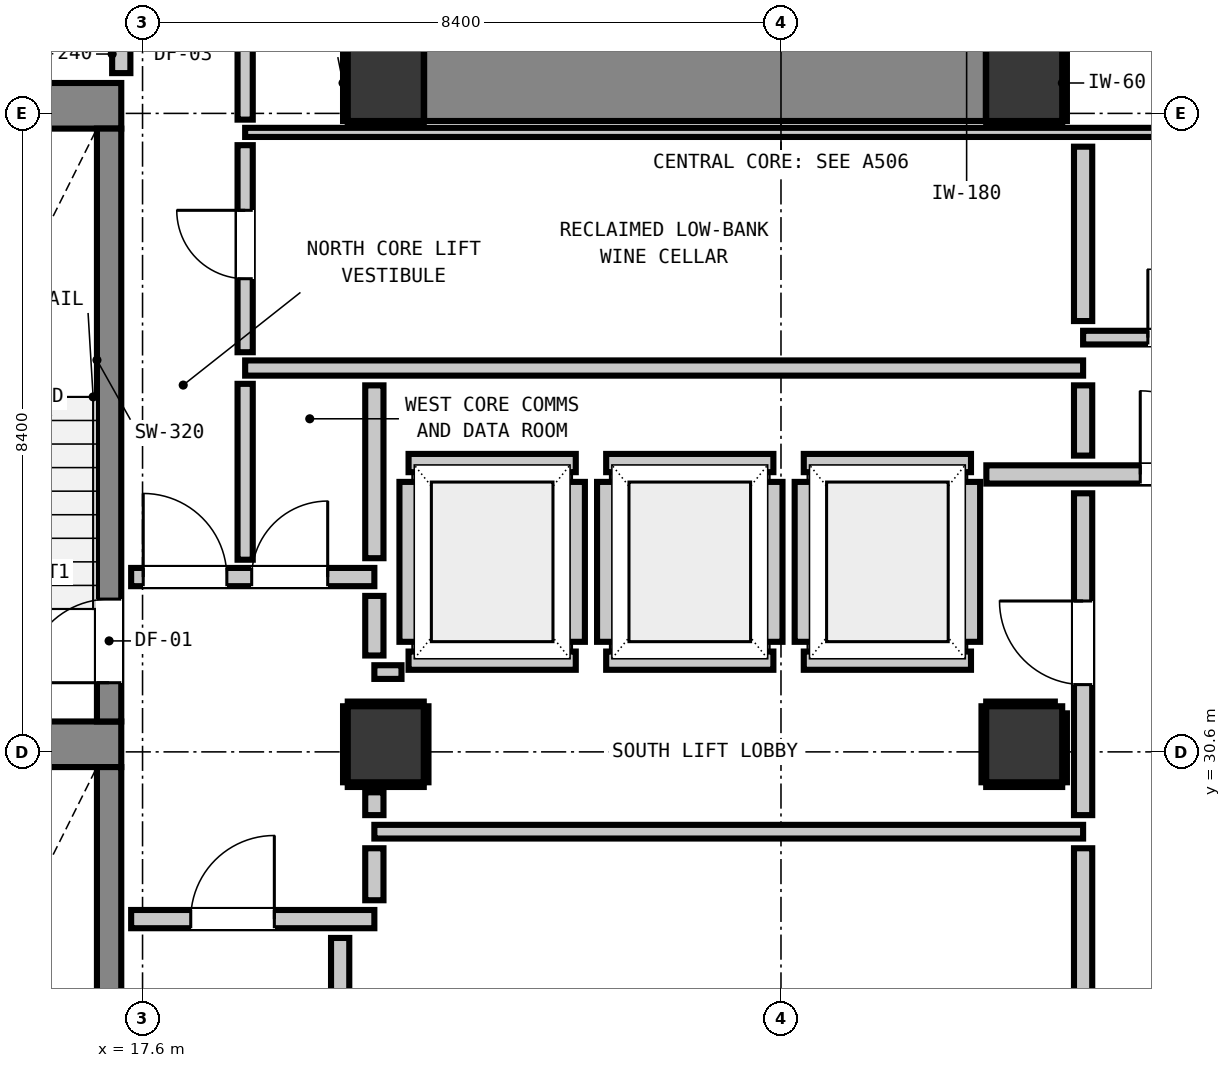
"""IFC4 building model, lengths in metres.
Left out: names, types, materials, properties, quantities, classifications, styles, units other than length and angle.
Written with IfcOpenShell. Run it as: python <this file> out.ifc"""

import sys

from ifc_helpers import new_model, si_unit, direction, frame, frame_2d, origin, origin_2d, place, context, subcontext, project, spatial, rectangle, extrude, element, fill, save


model = new_model("IFC4")
c1 = context("Model", 3, precision=1e-05, world=origin(), true_north=direction((0.0, 1.0)))
c2 = subcontext(c1, "Body", "Model", "MODEL_VIEW")
j1 = project(units=[si_unit("LENGTHUNIT", "METRE"), si_unit("PLANEANGLEUNIT", "RADIAN")], contexts=[c1])
p1 = place(None, origin())
s1 = spatial("IfcSite", under=j1, at=p1, CompositionType="ELEMENT")
p2 = place(p1, origin())
s2 = spatial("IfcBuilding", under=s1, at=p2, CompositionType="ELEMENT")
p3 = place(p2, frame((0.0, 0.0, 122.68)))
s3 = spatial("IfcBuildingStorey", under=s2, at=p3, CompositionType="ELEMENT", Elevation=122.68)
for number, where, z_axis, x_axis in (
    (1, (20.8, 39.4, 0.0), (0.0, 0.0, 1.0), (1.0, 0.0, 0.0)),
    (2, (29.2, 39.4, 0.0), (0.0, 0.0, 1.0), (1.0, 0.0, 0.0)),
):
    element("IfcColumn", number, at=place(p3, frame(where, z_axis=z_axis, x_axis=x_axis)), inside=s3, PredefinedType="COLUMN", context=c2, shape_type="SweptSolid", body=[
        extrude(rectangle(XDim=1.0, YDim=1.0, at=origin_2d()), origin(), (0.0, 0.0, 1.0), 3.32),
    ])
p4 = place(p3, frame((13.24, 39.1, 0.0), z_axis=(0.0, 0.0, 1.0), x_axis=(1.0, 0.0, 0.0)))
e3 = element("IfcWall", 3, at=p4, inside=s3, PredefinedType="SHEAR", context=c2, shape_type="SweptSolid", body=[
    extrude(rectangle(XDim=4.08, YDim=0.6, at=frame_2d((2.04, 0.0))), origin(), (0.0, 0.0, 1.0), 3.32),
])
p5 = place(p3, frame((13.905, 30.7, 0.0), z_axis=(0.0, 0.0, 1.0), x_axis=(1.0, 0.0, 0.0)))
e4 = element("IfcWall", 4, at=p5, inside=s3, PredefinedType="SHEAR", context=c2, shape_type="SweptSolid", body=[
    extrude(rectangle(XDim=3.415, YDim=0.6, at=frame_2d((1.708, 0.0))), origin(), (0.0, 0.0, 1.0), 3.32),
])
p6 = place(p3, frame((21.305, 39.4, 0.0), z_axis=(0.0, 0.0, 1.0), x_axis=(1.0, 0.0, 0.0)))
e5 = element("IfcWall", 5, at=p6, inside=s3, PredefinedType="SHEAR", context=c2, shape_type="SweptSolid", body=[
    extrude(rectangle(XDim=7.39, YDim=1.0, at=frame_2d((3.695, 0.0))), origin(), (0.0, 0.0, 1.0), 3.32),
])
p7 = place(p3, frame((17.16, 31.0, 0.0), z_axis=(0.0, 0.0, 1.0), x_axis=(0.0, 1.0, 0.0)))
e6 = element("IfcWall", 6, at=p7, inside=s3, PredefinedType="SHEAR", context=c2, shape_type="SweptSolid", body=[
    extrude(rectangle(XDim=7.8, YDim=0.32, at=frame_2d((3.9, 0.0))), origin(), (0.0, 0.0, 1.0), 3.32),
])
p8 = place(p7, frame((0.51, 0.0, 0.0)))
e7 = element("IfcOpeningElement", 7, at=p8, cuts=e6, PredefinedType="OPENING", context=c2, shape_type="SweptSolid", body=[
    extrude(rectangle(XDim=1.1, YDim=2.15, at=frame_2d((0.55, 1.075))), frame((0.0, 0.17, 0.0), z_axis=(0.0, -1.0, 0.0), x_axis=(1.0, 0.0, 0.0)), (0.0, 0.0, 1.0), 0.34),
])
p9 = place(p3, frame((17.16, 22.5, 0.0), z_axis=(0.0, 0.0, 1.0), x_axis=(0.0, 1.0, 0.0)))
e8 = element("IfcWall", 8, at=p9, inside=s3, PredefinedType="SHEAR", context=c2, shape_type="SweptSolid", body=[
    extrude(rectangle(XDim=7.9, YDim=0.32, at=frame_2d((3.95, 0.0))), origin(), (0.0, 0.0, 1.0), 3.32),
])
p10 = place(p9, frame((0.29, 0.0, 0.0)))
e9 = element("IfcOpeningElement", 9, at=p10, cuts=e8, PredefinedType="OPENING", context=c2, shape_type="SweptSolid", body=[
    extrude(rectangle(XDim=1.1, YDim=2.15, at=frame_2d((0.55, 1.075))), frame((0.0, 0.17, 0.0), z_axis=(0.0, -1.0, 0.0), x_axis=(1.0, 0.0, 0.0)), (0.0, 0.0, 1.0), 0.34),
])
for number, where, z_axis, x_axis in (
    (10, (20.8, 30.7, 0.0), (0.0, 0.0, 1.0), (1.0, 0.0, 0.0)),
    (11, (29.2, 30.7, 0.0), (0.0, 0.0, 1.0), (1.0, 0.0, 0.0)),
):
    element("IfcColumn", number, at=place(p3, frame(where, z_axis=z_axis, x_axis=x_axis)), inside=s3, PredefinedType="COLUMN", context=c2, shape_type="SweptSolid", body=[
        extrude(rectangle(XDim=1.0, YDim=1.0, at=origin_2d()), origin(), (0.0, 0.0, 1.0), 3.32),
    ])
for number, where, z_axis, x_axis in (
    (12, (21.1, 31.8, 0.0), (0.0, 0.0, 1.0), (1.0, 0.0, 0.0)),
    (13, (21.1, 34.4, 0.0), (0.0, 0.0, 1.0), (1.0, 0.0, 0.0)),
):
    element("IfcWall", number, at=place(p3, frame(where, z_axis=z_axis, x_axis=x_axis)), inside=s3, PredefinedType="PARTITIONING", context=c2, shape_type="SweptSolid", body=[
        extrude(rectangle(XDim=2.2, YDim=0.24, at=frame_2d((1.1, 0.0))), origin(), (0.0, 0.0, 1.0), 2.9),
    ])
p11 = place(p3, frame((21.1, 32.048, 0.0), z_axis=(0.0, 0.0, 1.0), x_axis=(0.0, 1.0, 0.0)))
e14 = element("IfcWall", 14, at=p11, inside=s3, PredefinedType="PARTITIONING", context=c2, shape_type="SweptSolid", body=[
    extrude(rectangle(XDim=2.104, YDim=0.24, at=frame_2d((1.052, 0.0))), origin(), (0.0, 0.0, 1.0), 0.905),
])
p12 = place(p3, frame((23.3, 32.048, 0.0), z_axis=(0.0, 0.0, 1.0), x_axis=(0.0, 1.0, 0.0)))
e15 = element("IfcWall", 15, at=p12, inside=s3, PredefinedType="PARTITIONING", context=c2, shape_type="SweptSolid", body=[
    extrude(rectangle(XDim=2.104, YDim=0.24, at=frame_2d((1.052, 0.0))), origin(), (0.0, 0.0, 1.0), 2.9),
])
for number, where, z_axis, x_axis in (
    (16, (23.7, 31.8, 0.0), (0.0, 0.0, 1.0), (1.0, 0.0, 0.0)),
    (17, (23.7, 34.4, 0.0), (0.0, 0.0, 1.0), (1.0, 0.0, 0.0)),
):
    element("IfcWall", number, at=place(p3, frame(where, z_axis=z_axis, x_axis=x_axis)), inside=s3, PredefinedType="PARTITIONING", context=c2, shape_type="SweptSolid", body=[
        extrude(rectangle(XDim=2.2, YDim=0.24, at=frame_2d((1.1, 0.0))), origin(), (0.0, 0.0, 1.0), 2.9),
    ])
for number, where, z_axis, x_axis in (
    (18, (23.7, 32.048, 0.0), (0.0, 0.0, 1.0), (0.0, 1.0, 0.0)),
    (19, (25.9, 32.048, 0.0), (0.0, 0.0, 1.0), (0.0, 1.0, 0.0)),
):
    element("IfcWall", number, at=place(p3, frame(where, z_axis=z_axis, x_axis=x_axis)), inside=s3, PredefinedType="PARTITIONING", context=c2, shape_type="SweptSolid", body=[
        extrude(rectangle(XDim=2.104, YDim=0.24, at=frame_2d((1.052, 0.0))), origin(), (0.0, 0.0, 1.0), 2.9),
    ])
for number, where, z_axis, x_axis in (
    (20, (26.3, 31.8, 0.0), (0.0, 0.0, 1.0), (1.0, 0.0, 0.0)),
    (21, (26.3, 34.4, 0.0), (0.0, 0.0, 1.0), (1.0, 0.0, 0.0)),
):
    element("IfcWall", number, at=place(p3, frame(where, z_axis=z_axis, x_axis=x_axis)), inside=s3, PredefinedType="PARTITIONING", context=c2, shape_type="SweptSolid", body=[
        extrude(rectangle(XDim=2.2, YDim=0.24, at=frame_2d((1.1, 0.0))), origin(), (0.0, 0.0, 1.0), 2.9),
    ])
p13 = place(p3, frame((26.3, 32.048, 0.0), z_axis=(0.0, 0.0, 1.0), x_axis=(0.0, 1.0, 0.0)))
e22 = element("IfcWall", 22, at=p13, inside=s3, PredefinedType="PARTITIONING", context=c2, shape_type="SweptSolid", body=[
    extrude(rectangle(XDim=2.104, YDim=0.24, at=frame_2d((1.052, 0.0))), origin(), (0.0, 0.0, 1.0), 2.9),
])
p14 = place(p3, frame((28.5, 32.048, 0.0), z_axis=(0.0, 0.0, 1.0), x_axis=(0.0, 1.0, 0.0)))
e23 = element("IfcWall", 23, at=p14, inside=s3, PredefinedType="PARTITIONING", context=c2, shape_type="SweptSolid", body=[
    extrude(rectangle(XDim=2.104, YDim=0.24, at=frame_2d((1.052, 0.0))), origin(), (0.0, 0.0, 1.0), 0.905),
])
p15 = place(p3, frame((17.45, 28.4, 0.0), z_axis=(0.0, 0.0, 1.0), x_axis=(1.0, 0.0, 0.0)))
e24 = element("IfcWall", 24, at=p15, inside=s3, PredefinedType="PARTITIONING", context=c2, shape_type="SweptSolid", body=[
    extrude(rectangle(XDim=3.2, YDim=0.24, at=frame_2d((1.6, 0.0))), origin(), (0.0, 0.0, 1.0), 2.9),
])
p16 = place(p15, frame((0.784, 0.0, 0.0)))
e25 = element("IfcOpeningElement", 25, at=p16, cuts=e24, PredefinedType="OPENING", context=c2, shape_type="SweptSolid", body=[
    extrude(rectangle(XDim=1.1, YDim=2.15, at=frame_2d((0.55, 1.075))), frame((0.0, 0.13, 0.0), z_axis=(0.0, -1.0, 0.0), x_axis=(1.0, 0.0, 0.0)), (0.0, 0.0, 1.0), 0.26),
])
p17 = place(p3, frame((17.45, 32.9, 0.0), z_axis=(0.0, 0.0, 1.0), x_axis=(1.0, 0.0, 0.0)))
e26 = element("IfcWall", 26, at=p17, inside=s3, PredefinedType="PARTITIONING", context=c2, shape_type="SweptSolid", body=[
    extrude(rectangle(XDim=3.2, YDim=0.24, at=frame_2d((1.6, 0.0))), origin(), (0.0, 0.0, 1.0), 2.9),
])
p18 = place(p17, frame((0.159, 0.0, 0.0)))
e27 = element("IfcOpeningElement", 27, at=p18, cuts=e26, PredefinedType="OPENING", context=c2, shape_type="SweptSolid", body=[
    extrude(rectangle(XDim=1.1, YDim=2.15, at=frame_2d((0.55, 1.075))), frame((0.0, 0.13, 0.0), z_axis=(0.0, -1.0, 0.0), x_axis=(1.0, 0.0, 0.0)), (0.0, 0.0, 1.0), 0.26),
])
p19 = place(p17, frame((1.586, 0.0, 0.0)))
e28 = element("IfcOpeningElement", 28, at=p19, cuts=e26, PredefinedType="OPENING", context=c2, shape_type="SweptSolid", body=[
    extrude(rectangle(XDim=1.0, YDim=2.15, at=frame_2d((0.5, 1.075))), frame((0.0, 0.13, 0.0), z_axis=(0.0, -1.0, 0.0), x_axis=(1.0, 0.0, 0.0)), (0.0, 0.0, 1.0), 0.26),
])
p20 = place(p3, frame((28.702, 34.25, 0.0), z_axis=(0.0, 0.0, 1.0), x_axis=(1.0, 0.0, 0.0)))
e29 = element("IfcWall", 29, at=p20, inside=s3, PredefinedType="PARTITIONING", context=c2, shape_type="SweptSolid", body=[
    extrude(rectangle(XDim=3.748, YDim=0.24, at=frame_2d((1.874, 0.0))), origin(), (0.0, 0.0, 1.0), 2.9),
])
p21 = place(p20, frame((2.025, 0.0, 0.0)))
e30 = element("IfcOpeningElement", 30, at=p21, cuts=e29, PredefinedType="OPENING", context=c2, shape_type="SweptSolid", body=[
    extrude(rectangle(XDim=1.1, YDim=2.15, at=frame_2d((0.55, 1.075))), frame((0.0, 0.13, 0.0), z_axis=(0.0, -1.0, 0.0), x_axis=(1.0, 0.0, 0.0)), (0.0, 0.0, 1.0), 0.26),
])
p22 = place(p3, frame((18.95, 35.65, 0.0), z_axis=(0.0, 0.0, 1.0), x_axis=(1.0, 0.0, 0.0)))
e31 = element("IfcWall", 31, at=p22, inside=s3, PredefinedType="PARTITIONING", context=c2, shape_type="SweptSolid", body=[
    extrude(rectangle(XDim=11.025, YDim=0.2, at=frame_2d((5.513, 0.0))), origin(), (0.0, 0.0, 1.0), 2.9),
])
p23 = place(p3, frame((20.65, 29.55, 0.0), z_axis=(0.0, 0.0, 1.0), x_axis=(1.0, 0.0, 0.0)))
e32 = element("IfcWall", 32, at=p23, inside=s3, PredefinedType="PARTITIONING", context=c2, shape_type="SweptSolid", body=[
    extrude(rectangle(XDim=9.325, YDim=0.18, at=frame_2d((4.663, 0.0))), origin(), (0.0, 0.0, 1.0), 2.9),
])
p24 = place(p3, frame((20.65, 31.65, 0.0), z_axis=(0.0, 0.0, 1.0), x_axis=(1.0, 0.0, 0.0)))
e33 = element("IfcWall", 33, at=p24, inside=s3, PredefinedType="PARTITIONING", context=c2, shape_type="SweptSolid", body=[
    extrude(rectangle(XDim=0.357, YDim=0.18, at=frame_2d((0.179, 0.0))), origin(), (0.0, 0.0, 1.0), 2.9),
])
p25 = place(p3, frame((29.975, 36.05, 0.0), z_axis=(0.0, 0.0, 1.0), x_axis=(1.0, 0.0, 0.0)))
e34 = element("IfcWall", 34, at=p25, inside=s3, PredefinedType="PARTITIONING", context=c2, shape_type="SweptSolid", body=[
    extrude(rectangle(XDim=2.505, YDim=0.18, at=frame_2d((1.252, 0.0))), origin(), (0.0, 0.0, 1.0), 2.9),
])
p26 = place(p25, frame((0.852, 0.0, 0.0)))
e35 = element("IfcOpeningElement", 35, at=p26, cuts=e34, PredefinedType="OPENING", context=c2, shape_type="SweptSolid", body=[
    extrude(rectangle(XDim=0.9, YDim=2.1, at=frame_2d((0.45, 1.05))), frame((0.0, 0.1, 0.0), z_axis=(0.0, -1.0, 0.0), x_axis=(1.0, 0.0, 0.0)), (0.0, 0.0, 1.0), 0.2),
])
p27 = place(p3, frame((18.95, 38.75, 0.0), z_axis=(0.0, 0.0, 1.0), x_axis=(1.0, 0.0, 0.0)))
e36 = element("IfcWall", 36, at=p27, inside=s3, PredefinedType="PARTITIONING", context=c2, shape_type="SweptSolid", body=[
    extrude(rectangle(XDim=13.56, YDim=0.12, at=frame_2d((6.78, 0.0))), origin(), (0.0, 0.0, 1.0), 0.905),
])
p28 = place(p3, frame((17.32, 39.53, 0.0), z_axis=(0.0, 0.0, 1.0), x_axis=(0.0, 1.0, 0.0)))
e37 = element("IfcWall", 37, at=p28, inside=s3, PredefinedType="PARTITIONING", context=c2, shape_type="SweptSolid", body=[
    extrude(rectangle(XDim=0.502, YDim=0.24, at=frame_2d((0.251, 0.0))), origin(), (0.0, 0.0, 1.0), 2.9),
])
p29 = place(p3, frame((20.2, 22.586, 0.0), z_axis=(0.0, 0.0, 1.0), x_axis=(0.0, 1.0, 0.0)))
e38 = element("IfcWall", 38, at=p29, inside=s3, PredefinedType="PARTITIONING", context=c2, shape_type="SweptSolid", body=[
    extrude(rectangle(XDim=5.566, YDim=0.24, at=frame_2d((2.783, 0.0))), origin(), (0.0, 0.0, 1.0), 0.905),
])
p30 = place(p3, frame((20.65, 28.648, 0.0), z_axis=(0.0, 0.0, 1.0), x_axis=(0.0, 1.0, 0.0)))
e39 = element("IfcWall", 39, at=p30, inside=s3, PredefinedType="PARTITIONING", context=c2, shape_type="SweptSolid", body=[
    extrude(rectangle(XDim=0.684, YDim=0.24, at=frame_2d((0.342, 0.0))), origin(), (0.0, 0.0, 1.0), 0.905),
])
p31 = place(p3, frame((20.65, 29.768, 0.0), z_axis=(0.0, 0.0, 1.0), x_axis=(0.0, 1.0, 0.0)))
e40 = element("IfcWall", 40, at=p31, inside=s3, PredefinedType="PARTITIONING", context=c2, shape_type="SweptSolid", body=[
    extrude(rectangle(XDim=0.3, YDim=0.24, at=frame_2d((0.15, 0.0))), origin(), (0.0, 0.0, 1.0), 0.905),
])
p32 = place(p3, frame((20.65, 31.868, 0.0), z_axis=(0.0, 0.0, 1.0), x_axis=(0.0, 1.0, 0.0)))
e41 = element("IfcWall", 41, at=p32, inside=s3, PredefinedType="PARTITIONING", context=c2, shape_type="SweptSolid", body=[
    extrude(rectangle(XDim=0.784, YDim=0.24, at=frame_2d((0.392, 0.0))), origin(), (0.0, 0.0, 1.0), 0.905),
])
p33 = place(p3, frame((20.65, 33.148, 0.0), z_axis=(0.0, 0.0, 1.0), x_axis=(0.0, 1.0, 0.0)))
e42 = element("IfcWall", 42, at=p33, inside=s3, PredefinedType="PARTITIONING", context=c2, shape_type="SweptSolid", body=[
    extrude(rectangle(XDim=2.274, YDim=0.24, at=frame_2d((1.137, 0.0))), origin(), (0.0, 0.0, 1.0), 0.905),
])
p34 = place(p3, frame((29.975, 25.648, 0.0), z_axis=(0.0, 0.0, 1.0), x_axis=(0.0, 1.0, 0.0)))
e43 = element("IfcWall", 43, at=p34, inside=s3, PredefinedType="PARTITIONING", context=c2, shape_type="SweptSolid", body=[
    extrude(rectangle(XDim=3.684, YDim=0.24, at=frame_2d((1.842, 0.0))), origin(), (0.0, 0.0, 1.0), 2.9),
])
p35 = place(p3, frame((29.975, 29.768, 0.0), z_axis=(0.0, 0.0, 1.0), x_axis=(0.0, 1.0, 0.0)))
e44 = element("IfcWall", 44, at=p35, inside=s3, PredefinedType="PARTITIONING", context=c2, shape_type="SweptSolid", body=[
    extrude(rectangle(XDim=4.234, YDim=0.24, at=frame_2d((2.117, 0.0))), origin(), (0.0, 0.0, 1.0), 2.9),
])
p36 = place(p35, frame((1.717, 0.0, 0.0)))
e45 = element("IfcOpeningElement", 45, at=p36, cuts=e44, PredefinedType="OPENING", context=c2, shape_type="SweptSolid", body=[
    extrude(rectangle(XDim=1.1, YDim=2.15, at=frame_2d((0.55, 1.075))), frame((0.0, 0.13, 0.0), z_axis=(0.0, -1.0, 0.0), x_axis=(1.0, 0.0, 0.0)), (0.0, 0.0, 1.0), 0.26),
])
p37 = place(p3, frame((29.975, 34.498, 0.0), z_axis=(0.0, 0.0, 1.0), x_axis=(0.0, 1.0, 0.0)))
e46 = element("IfcWall", 46, at=p37, inside=s3, PredefinedType="PARTITIONING", context=c2, shape_type="SweptSolid", body=[
    extrude(rectangle(XDim=0.924, YDim=0.24, at=frame_2d((0.462, 0.0))), origin(), (0.0, 0.0, 1.0), 2.9),
])
p38 = place(p3, frame((29.975, 36.268, 0.0), z_axis=(0.0, 0.0, 1.0), x_axis=(0.0, 1.0, 0.0)))
e47 = element("IfcWall", 47, at=p38, inside=s3, PredefinedType="PARTITIONING", context=c2, shape_type="SweptSolid", body=[
    extrude(rectangle(XDim=2.294, YDim=0.24, at=frame_2d((1.147, 0.0))), origin(), (0.0, 0.0, 1.0), 2.9),
])
p39 = place(p3, frame((18.95, 33.128, 0.0), z_axis=(0.0, 0.0, 1.0), x_axis=(0.0, 1.0, 0.0)))
e48 = element("IfcWall", 48, at=p39, inside=s3, PredefinedType="PARTITIONING", context=c2, shape_type="SweptSolid", body=[
    extrude(rectangle(XDim=2.314, YDim=0.2, at=frame_2d((1.157, 0.0))), origin(), (0.0, 0.0, 1.0), 2.9),
])
p40 = place(p3, frame((18.95, 35.858, 0.0), z_axis=(0.0, 0.0, 1.0), x_axis=(0.0, 1.0, 0.0)))
e49 = element("IfcWall", 49, at=p40, inside=s3, PredefinedType="PARTITIONING", context=c2, shape_type="SweptSolid", body=[
    extrude(rectangle(XDim=2.724, YDim=0.2, at=frame_2d((1.362, 0.0))), origin(), (0.0, 0.0, 1.0), 2.9),
])
p41 = place(p40, frame((0.967, 0.0, 0.0)))
e50 = element("IfcOpeningElement", 50, at=p41, cuts=e49, PredefinedType="OPENING", context=c2, shape_type="SweptSolid", body=[
    extrude(rectangle(XDim=0.9, YDim=2.1, at=frame_2d((0.45, 1.05))), frame((0.0, 0.11, 0.0), z_axis=(0.0, -1.0, 0.0), x_axis=(1.0, 0.0, 0.0)), (0.0, 0.0, 1.0), 0.22),
])
p42 = place(p3, frame((18.95, 38.918, 0.0), z_axis=(0.0, 0.0, 1.0), x_axis=(0.0, 1.0, 0.0)))
e51 = element("IfcWall", 51, at=p42, inside=s3, PredefinedType="PARTITIONING", context=c2, shape_type="SweptSolid", body=[
    extrude(rectangle(XDim=1.134, YDim=0.2, at=frame_2d((0.567, 0.0))), origin(), (0.0, 0.0, 1.0), 2.9),
])
for number, where, z_axis, x_axis in (
    (52, (20.3, 38.868, 0.0), (0.0, 0.0, 1.0), (1.0, 0.0, 0.0)),
    (53, (20.268, 38.9, 0.0), (0.0, 0.0, 1.0), (0.0, 1.0, 0.0)),
    (54, (28.7, 38.868, 0.0), (0.0, 0.0, 1.0), (1.0, 0.0, 0.0)),
    (55, (29.732, 38.9, 0.0), (0.0, 0.0, 1.0), (0.0, 1.0, 0.0)),
    (56, (20.3, 30.168, 0.0), (0.0, 0.0, 1.0), (1.0, 0.0, 0.0)),
    (57, (20.3, 31.232, 0.0), (0.0, 0.0, 1.0), (1.0, 0.0, 0.0)),
    (58, (20.268, 30.2, 0.0), (0.0, 0.0, 1.0), (0.0, 1.0, 0.0)),
    (59, (21.332, 30.2, 0.0), (0.0, 0.0, 1.0), (0.0, 1.0, 0.0)),
    (60, (28.7, 30.168, 0.0), (0.0, 0.0, 1.0), (1.0, 0.0, 0.0)),
):
    element("IfcWall", number, at=place(p3, frame(where, z_axis=z_axis, x_axis=x_axis)), inside=s3, PredefinedType="PARTITIONING", context=c2, shape_type="SweptSolid", body=[
        extrude(rectangle(XDim=1.0, YDim=0.06, at=frame_2d((0.5, 0.0))), origin(), (0.0, 0.0, 1.0), 0.905),
    ])
p43 = place(p3, frame((28.7, 31.232, 0.0), z_axis=(0.0, 0.0, 1.0), x_axis=(1.0, 0.0, 0.0)))
e61 = element("IfcWall", 61, at=p43, inside=s3, PredefinedType="PARTITIONING", context=c2, shape_type="SweptSolid", body=[
    extrude(rectangle(XDim=0.903, YDim=0.06, at=frame_2d((0.452, 0.0))), origin(), (0.0, 0.0, 1.0), 0.905),
])
p44 = place(p3, frame((28.668, 30.2, 0.0), z_axis=(0.0, 0.0, 1.0), x_axis=(0.0, 1.0, 0.0)))
e62 = element("IfcWall", 62, at=p44, inside=s3, PredefinedType="PARTITIONING", context=c2, shape_type="SweptSolid", body=[
    extrude(rectangle(XDim=1.0, YDim=0.06, at=frame_2d((0.5, 0.0))), origin(), (0.0, 0.0, 1.0), 0.905),
])
p45 = place(p3, frame((29.732, 30.2, 0.0), z_axis=(0.0, 0.0, 1.0), x_axis=(0.0, 1.0, 0.0)))
e63 = element("IfcWall", 63, at=p45, inside=s3, PredefinedType="PARTITIONING", context=c2, shape_type="SweptSolid", body=[
    extrude(rectangle(XDim=0.907, YDim=0.06, at=frame_2d((0.454, 0.0))), origin(), (0.0, 0.0, 1.0), 0.905),
])
p46 = place(p8, origin())
e64 = element("IfcDoor", 64, at=p46, inside=s3, OperationType="SINGLE_SWING_LEFT", PredefinedType="DOOR", context=c2, shape_type="SweptSolid", body=[
    extrude(rectangle(XDim=1.1, YDim=2.15, at=frame_2d((0.55, 1.075))), frame((0.0, 0.025, 0.0), z_axis=(0.0, -1.0, 0.0), x_axis=(1.0, 0.0, 0.0)), (0.0, 0.0, 1.0), 0.05),
])
fill(e7, e64)
p47 = place(p16, origin())
e65 = element("IfcDoor", 65, at=p47, inside=s3, OperationType="SINGLE_SWING_RIGHT", PredefinedType="DOOR", context=c2, shape_type="SweptSolid", body=[
    extrude(rectangle(XDim=1.1, YDim=2.15, at=frame_2d((0.55, 1.075))), frame((0.0, 0.025, 0.0), z_axis=(0.0, -1.0, 0.0), x_axis=(1.0, 0.0, 0.0)), (0.0, 0.0, 1.0), 0.05),
])
fill(e25, e65)
p48 = place(p18, origin())
e66 = element("IfcDoor", 66, at=p48, inside=s3, OperationType="SINGLE_SWING_LEFT", PredefinedType="DOOR", context=c2, shape_type="SweptSolid", body=[
    extrude(rectangle(XDim=1.1, YDim=2.15, at=frame_2d((0.55, 1.075))), frame((0.0, 0.025, 0.0), z_axis=(0.0, -1.0, 0.0), x_axis=(1.0, 0.0, 0.0)), (0.0, 0.0, 1.0), 0.05),
])
fill(e27, e66)
p49 = place(p36, origin())
e67 = element("IfcDoor", 67, at=p49, inside=s3, OperationType="SINGLE_SWING_RIGHT", PredefinedType="DOOR", context=c2, shape_type="SweptSolid", body=[
    extrude(rectangle(XDim=1.1, YDim=2.15, at=frame_2d((0.55, 1.075))), frame((0.0, 0.025, 0.0), z_axis=(0.0, -1.0, 0.0), x_axis=(1.0, 0.0, 0.0)), (0.0, 0.0, 1.0), 0.05),
])
fill(e45, e67)
p50 = place(p21, origin())
e68 = element("IfcDoor", 68, at=p50, inside=s3, OperationType="SINGLE_SWING_LEFT", PredefinedType="DOOR", context=c2, shape_type="SweptSolid", body=[
    extrude(rectangle(XDim=1.1, YDim=2.15, at=frame_2d((0.55, 1.075))), frame((0.0, 0.025, 0.0), z_axis=(0.0, -1.0, 0.0), x_axis=(1.0, 0.0, 0.0)), (0.0, 0.0, 1.0), 0.05),
])
fill(e30, e68)
p51 = place(p19, origin())
e69 = element("IfcDoor", 69, at=p51, inside=s3, OperationType="SINGLE_SWING_RIGHT", PredefinedType="DOOR", context=c2, shape_type="SweptSolid", body=[
    extrude(rectangle(XDim=1.0, YDim=2.15, at=frame_2d((0.5, 1.075))), frame((0.0, 0.025, 0.0), z_axis=(0.0, -1.0, 0.0), x_axis=(1.0, 0.0, 0.0)), (0.0, 0.0, 1.0), 0.05),
])
fill(e28, e69)
p52 = place(p26, origin())
e70 = element("IfcDoor", 70, at=p52, inside=s3, OperationType="SINGLE_SWING_LEFT", PredefinedType="DOOR", context=c2, shape_type="SweptSolid", body=[
    extrude(rectangle(XDim=0.9, YDim=2.1, at=frame_2d((0.45, 1.05))), frame((0.0, 0.025, 0.0), z_axis=(0.0, -1.0, 0.0), x_axis=(1.0, 0.0, 0.0)), (0.0, 0.0, 1.0), 0.05),
])
fill(e35, e70)
p53 = place(p41, origin())
e71 = element("IfcDoor", 71, at=p53, inside=s3, OperationType="SINGLE_SWING_RIGHT", PredefinedType="DOOR", context=c2, shape_type="SweptSolid", body=[
    extrude(rectangle(XDim=0.9, YDim=2.1, at=frame_2d((0.45, 1.05))), frame((0.0, 0.025, 0.0), z_axis=(0.0, -1.0, 0.0), x_axis=(1.0, 0.0, 0.0)), (0.0, 0.0, 1.0), 0.05),
])
fill(e50, e71)
save(model, sys.argv[1])
